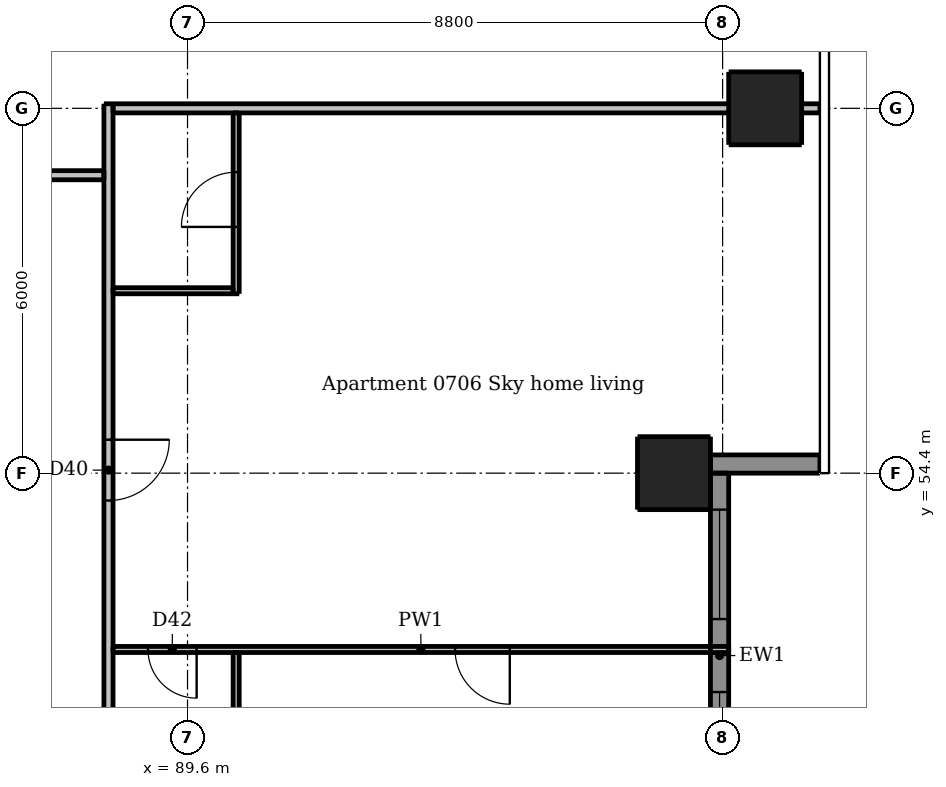
"""IFC4 building model, lengths in metres.
Left out: names, types, materials, properties, quantities, classifications, styles, units other than length and angle.
Written with IfcOpenShell. Run it as: python <this file> out.ifc"""

import sys

from ifc_helpers import new_model, si_unit, direction, frame, frame_2d, origin, origin_2d, place, context, subcontext, project, spatial, rectangle, extrude, element, fill, save


model = new_model("IFC4")
c1 = context("Model", 3, precision=1e-05, world=origin(), true_north=direction((0.0, 1.0)))
c2 = subcontext(c1, "Body", "Model", "MODEL_VIEW")
j1 = project(units=[si_unit("LENGTHUNIT", "METRE"), si_unit("PLANEANGLEUNIT", "RADIAN")], contexts=[c1])
p1 = place(None, origin())
s1 = spatial("IfcSite", under=j1, at=p1, CompositionType="ELEMENT")
p2 = place(p1, origin())
s2 = spatial("IfcBuilding", under=s1, at=p2, CompositionType="ELEMENT")
p3 = place(p2, frame((0.0, 0.0, 30.1)))
s3 = spatial("IfcBuildingStorey", under=s2, at=p3, CompositionType="ELEMENT", Elevation=30.1)
for number, where, z_axis, x_axis in (
    (1, (97.6, 54.4, 0.0), (0.0, 0.0, 1.0), (1.0, 0.0, 0.0)),
    (2, (99.1, 60.4, 0.0), (0.0, 0.0, 1.0), (1.0, 0.0, 0.0)),
):
    element("IfcColumn", number, at=place(p3, frame(where, z_axis=z_axis, x_axis=x_axis)), inside=s3, PredefinedType="COLUMN", context=c2, shape_type="SweptSolid", body=[
        extrude(rectangle(XDim=1.2, YDim=1.2, at=origin_2d()), origin(), (0.0, 0.0, 1.0), 3.05),
    ])
p4 = place(p3, frame((98.2, 54.55, 0.0), z_axis=(0.0, 0.0, 1.0), x_axis=(1.0, 0.0, 0.0)))
e3 = element("IfcWall", 3, at=p4, inside=s3, PredefinedType="SOLIDWALL", context=c2, shape_type="SweptSolid", body=[
    extrude(rectangle(XDim=1.8, YDim=0.3, at=frame_2d((0.9, 0.0))), origin(), (0.0, 0.0, 1.0), 3.05),
])
p5 = place(p3, frame((98.35, 48.4, 0.0), z_axis=(0.0, 0.0, 1.0), x_axis=(0.0, 1.0, 0.0)))
e4 = element("IfcWall", 4, at=p5, inside=s3, PredefinedType="SOLIDWALL", context=c2, shape_type="SweptSolid", body=[
    extrude(rectangle(XDim=6.0, YDim=0.3, at=frame_2d((3.0, 0.0))), origin(), (0.0, 0.0, 1.0), 3.05),
])
p6 = place(p5, frame((0.6, 0.0, 0.15)))
e5 = element("IfcOpeningElement", 5, at=p6, cuts=e4, PredefinedType="OPENING", context=c2, shape_type="SweptSolid", body=[
    extrude(rectangle(XDim=1.8, YDim=2.1, at=frame_2d((0.9, 1.05))), frame((0.0, 0.16, 0.0), z_axis=(0.0, -1.0, 0.0), x_axis=(1.0, 0.0, 0.0)), (0.0, 0.0, 1.0), 0.32),
])
p7 = place(p5, frame((3.6, 0.0, 0.15)))
e6 = element("IfcOpeningElement", 6, at=p7, cuts=e4, PredefinedType="OPENING", context=c2, shape_type="SweptSolid", body=[
    extrude(rectangle(XDim=1.8, YDim=2.1, at=frame_2d((0.9, 1.05))), frame((0.0, 0.16, 0.0), z_axis=(0.0, -1.0, 0.0), x_axis=(1.0, 0.0, 0.0)), (0.0, 0.0, 1.0), 0.32),
])
p8 = place(p3, frame((90.4, 48.5, 0.0), z_axis=(0.0, 0.0, 1.0), x_axis=(0.0, 1.0, 0.0)))
e7 = element("IfcWall", 7, at=p8, inside=s3, PredefinedType="PARTITIONING", context=c2, shape_type="SweptSolid", body=[
    extrude(rectangle(XDim=2.95, YDim=0.1, at=frame_2d((1.475, 0.0))), origin(), (0.0, 0.0, 1.0), 3.05),
])
p9 = place(p3, frame((90.4, 57.35, 0.0), z_axis=(0.0, 0.0, 1.0), x_axis=(0.0, 1.0, 0.0)))
e8 = element("IfcWall", 8, at=p9, inside=s3, PredefinedType="PARTITIONING", context=c2, shape_type="SweptSolid", body=[
    extrude(rectangle(XDim=2.975, YDim=0.1, at=frame_2d((1.487, 0.0))), origin(), (0.0, 0.0, 1.0), 3.05),
])
p10 = place(p9, frame((1.1, 0.0, 0.0)))
e9 = element("IfcOpeningElement", 9, at=p10, cuts=e8, PredefinedType="OPENING", context=c2, shape_type="SweptSolid", body=[
    extrude(rectangle(XDim=0.9, YDim=2.1, at=frame_2d((0.45, 1.05))), frame((0.0, 0.06, 0.0), z_axis=(0.0, -1.0, 0.0), x_axis=(1.0, 0.0, 0.0)), (0.0, 0.0, 1.0), 0.12),
])
p11 = place(p3, frame((88.375, 57.4, 0.0), z_axis=(0.0, 0.0, 1.0), x_axis=(1.0, 0.0, 0.0)))
e10 = element("IfcWall", 10, at=p11, inside=s3, PredefinedType="PARTITIONING", context=c2, shape_type="SweptSolid", body=[
    extrude(rectangle(XDim=1.975, YDim=0.1, at=frame_2d((0.988, 0.0))), origin(), (0.0, 0.0, 1.0), 3.05),
])
p12 = place(p3, frame((98.5, 51.5, 0.0), z_axis=(0.0, 0.0, 1.0), x_axis=(-1.0, 0.0, 0.0)))
e11 = element("IfcWall", 11, at=p12, inside=s3, PredefinedType="PARTITIONING", context=c2, shape_type="SweptSolid", body=[
    extrude(rectangle(XDim=10.125, YDim=0.1, at=frame_2d((5.062, 0.0))), origin(), (0.0, 0.0, 1.0), 3.05),
])
p13 = place(p12, frame((3.6, 0.0, 0.0)))
e12 = element("IfcOpeningElement", 12, at=p13, cuts=e11, PredefinedType="OPENING", context=c2, shape_type="SweptSolid", body=[
    extrude(rectangle(XDim=0.9, YDim=2.1, at=frame_2d((0.45, 1.05))), frame((0.0, 0.06, 0.0), z_axis=(0.0, -1.0, 0.0), x_axis=(1.0, 0.0, 0.0)), (0.0, 0.0, 1.0), 0.12),
])
p14 = place(p12, frame((8.75, 0.0, 0.0)))
e13 = element("IfcOpeningElement", 13, at=p14, cuts=e11, PredefinedType="OPENING", context=c2, shape_type="SweptSolid", body=[
    extrude(rectangle(XDim=0.8, YDim=2.1, at=frame_2d((0.4, 1.05))), frame((0.0, 0.06, 0.0), z_axis=(0.0, -1.0, 0.0), x_axis=(1.0, 0.0, 0.0)), (0.0, 0.0, 1.0), 0.12),
])
p15 = place(p3, frame((88.3, 60.475, 0.0), z_axis=(0.0, 0.0, 1.0), x_axis=(0.0, -1.0, 0.0)))
e14 = element("IfcWall", 14, at=p15, inside=s3, PredefinedType="PARTITIONING", context=c2, shape_type="SweptSolid", body=[
    extrude(rectangle(XDim=28.7, YDim=0.15, at=frame_2d((14.35, 0.0))), origin(), (0.0, 0.0, 1.0), 3.05),
])
p16 = place(p15, frame((27.425, 0.0, 0.0)))
e15 = element("IfcOpeningElement", 15, at=p16, cuts=e14, PredefinedType="OPENING", context=c2, shape_type="SweptSolid", body=[
    extrude(rectangle(XDim=1.0, YDim=2.1, at=frame_2d((0.5, 1.05))), frame((0.0, 0.085, 0.0), z_axis=(0.0, -1.0, 0.0), x_axis=(1.0, 0.0, 0.0)), (0.0, 0.0, 1.0), 0.17),
])
p17 = place(p15, frame((16.325, 0.0, 0.0)))
e16 = element("IfcOpeningElement", 16, at=p17, cuts=e14, PredefinedType="OPENING", context=c2, shape_type="SweptSolid", body=[
    extrude(rectangle(XDim=1.0, YDim=2.1, at=frame_2d((0.5, 1.05))), frame((0.0, 0.085, 0.0), z_axis=(0.0, -1.0, 0.0), x_axis=(1.0, 0.0, 0.0)), (0.0, 0.0, 1.0), 0.17),
])
p18 = place(p15, frame((5.525, 0.0, 0.0)))
e17 = element("IfcOpeningElement", 17, at=p18, cuts=e14, PredefinedType="OPENING", context=c2, shape_type="SweptSolid", body=[
    extrude(rectangle(XDim=1.0, YDim=2.1, at=frame_2d((0.5, 1.05))), frame((0.0, 0.085, 0.0), z_axis=(0.0, -1.0, 0.0), x_axis=(1.0, 0.0, 0.0)), (0.0, 0.0, 1.0), 0.17),
])
p19 = place(p3, frame((88.375, 60.4, 0.0), z_axis=(0.0, 0.0, 1.0), x_axis=(1.0, 0.0, 0.0)))
e18 = element("IfcWall", 18, at=p19, inside=s3, PredefinedType="PARTITIONING", context=c2, shape_type="SweptSolid", body=[
    extrude(rectangle(XDim=11.625, YDim=0.15, at=frame_2d((5.812, 0.0))), origin(), (0.0, 0.0, 1.0), 2.516),
])
p20 = place(p3, frame((59.675, 59.3, 0.0), z_axis=(0.0, 0.0, 1.0), x_axis=(1.0, 0.0, 0.0)))
e19 = element("IfcWall", 19, at=p20, inside=s3, PredefinedType="PARTITIONING", context=c2, shape_type="SweptSolid", body=[
    extrude(rectangle(XDim=28.55, YDim=0.15, at=frame_2d((14.275, 0.0))), origin(), (0.0, 0.0, 1.0), 3.05),
])
p21 = place(p20, frame((2.425, 0.0, 0.0)))
e20 = element("IfcOpeningElement", 20, at=p21, cuts=e19, PredefinedType="OPENING", context=c2, shape_type="SweptSolid", body=[
    extrude(rectangle(XDim=1.0, YDim=2.1, at=frame_2d((0.5, 1.05))), frame((0.0, 0.085, 0.0), z_axis=(0.0, -1.0, 0.0), x_axis=(1.0, 0.0, 0.0)), (0.0, 0.0, 1.0), 0.17),
])
p22 = place(p20, frame((8.425, 0.0, 0.0)))
e21 = element("IfcOpeningElement", 21, at=p22, cuts=e19, PredefinedType="OPENING", context=c2, shape_type="SweptSolid", body=[
    extrude(rectangle(XDim=1.0, YDim=2.1, at=frame_2d((0.5, 1.05))), frame((0.0, 0.085, 0.0), z_axis=(0.0, -1.0, 0.0), x_axis=(1.0, 0.0, 0.0)), (0.0, 0.0, 1.0), 0.17),
])
p23 = place(p20, frame((14.425, 0.0, 0.0)))
e22 = element("IfcOpeningElement", 22, at=p23, cuts=e19, PredefinedType="OPENING", context=c2, shape_type="SweptSolid", body=[
    extrude(rectangle(XDim=1.0, YDim=2.1, at=frame_2d((0.5, 1.05))), frame((0.0, 0.085, 0.0), z_axis=(0.0, -1.0, 0.0), x_axis=(1.0, 0.0, 0.0)), (0.0, 0.0, 1.0), 0.17),
])
p24 = place(p20, frame((25.775, 0.0, 0.0)))
e23 = element("IfcOpeningElement", 23, at=p24, cuts=e19, PredefinedType="OPENING", context=c2, shape_type="SweptSolid", body=[
    extrude(rectangle(XDim=1.0, YDim=2.1, at=frame_2d((0.5, 1.05))), frame((0.0, 0.085, 0.0), z_axis=(0.0, -1.0, 0.0), x_axis=(1.0, 0.0, 0.0)), (0.0, 0.0, 1.0), 0.17),
])
p25 = place(p6, origin())
e24 = element("IfcWindow", 24, at=p25, inside=s3, PartitioningType="DOUBLE_PANEL_VERTICAL", PredefinedType="WINDOW", context=c2, shape_type="SweptSolid", body=[
    extrude(rectangle(XDim=1.8, YDim=2.1, at=frame_2d((0.9, 1.05))), frame((0.0, 0.03, 0.0), z_axis=(0.0, -1.0, 0.0), x_axis=(1.0, 0.0, 0.0)), (0.0, 0.0, 1.0), 0.06),
])
fill(e5, e24)
p26 = place(p7, origin())
e25 = element("IfcWindow", 25, at=p26, inside=s3, PartitioningType="DOUBLE_PANEL_VERTICAL", PredefinedType="WINDOW", context=c2, shape_type="SweptSolid", body=[
    extrude(rectangle(XDim=1.8, YDim=2.1, at=frame_2d((0.9, 1.05))), frame((0.0, 0.03, 0.0), z_axis=(0.0, -1.0, 0.0), x_axis=(1.0, 0.0, 0.0)), (0.0, 0.0, 1.0), 0.06),
])
fill(e6, e25)
p27 = place(p18, origin())
e26 = element("IfcDoor", 26, at=p27, inside=s3, OperationType="SINGLE_SWING_LEFT", PredefinedType="DOOR", context=c2, shape_type="SweptSolid", body=[
    extrude(rectangle(XDim=1.0, YDim=2.1, at=frame_2d((0.5, 1.05))), frame((0.0, 0.025, 0.0), z_axis=(0.0, -1.0, 0.0), x_axis=(1.0, 0.0, 0.0)), (0.0, 0.0, 1.0), 0.05),
])
fill(e17, e26)
p28 = place(p10, origin())
e27 = element("IfcDoor", 27, at=p28, inside=s3, OperationType="SINGLE_SWING_LEFT", PredefinedType="DOOR", context=c2, shape_type="SweptSolid", body=[
    extrude(rectangle(XDim=0.9, YDim=2.1, at=frame_2d((0.45, 1.05))), frame((0.0, 0.025, 0.0), z_axis=(0.0, -1.0, 0.0), x_axis=(1.0, 0.0, 0.0)), (0.0, 0.0, 1.0), 0.05),
])
fill(e9, e27)
p29 = place(p13, origin())
e28 = element("IfcDoor", 28, at=p29, inside=s3, OperationType="SINGLE_SWING_LEFT", PredefinedType="DOOR", context=c2, shape_type="SweptSolid", body=[
    extrude(rectangle(XDim=0.9, YDim=2.1, at=frame_2d((0.45, 1.05))), frame((0.0, 0.025, 0.0), z_axis=(0.0, -1.0, 0.0), x_axis=(1.0, 0.0, 0.0)), (0.0, 0.0, 1.0), 0.05),
])
fill(e12, e28)
p30 = place(p14, origin())
e29 = element("IfcDoor", 29, at=p30, inside=s3, OperationType="SINGLE_SWING_LEFT", PredefinedType="DOOR", context=c2, shape_type="SweptSolid", body=[
    extrude(rectangle(XDim=0.8, YDim=2.1, at=frame_2d((0.4, 1.05))), frame((0.0, 0.025, 0.0), z_axis=(0.0, -1.0, 0.0), x_axis=(1.0, 0.0, 0.0)), (0.0, 0.0, 1.0), 0.05),
])
fill(e13, e29)
save(model, sys.argv[1])
